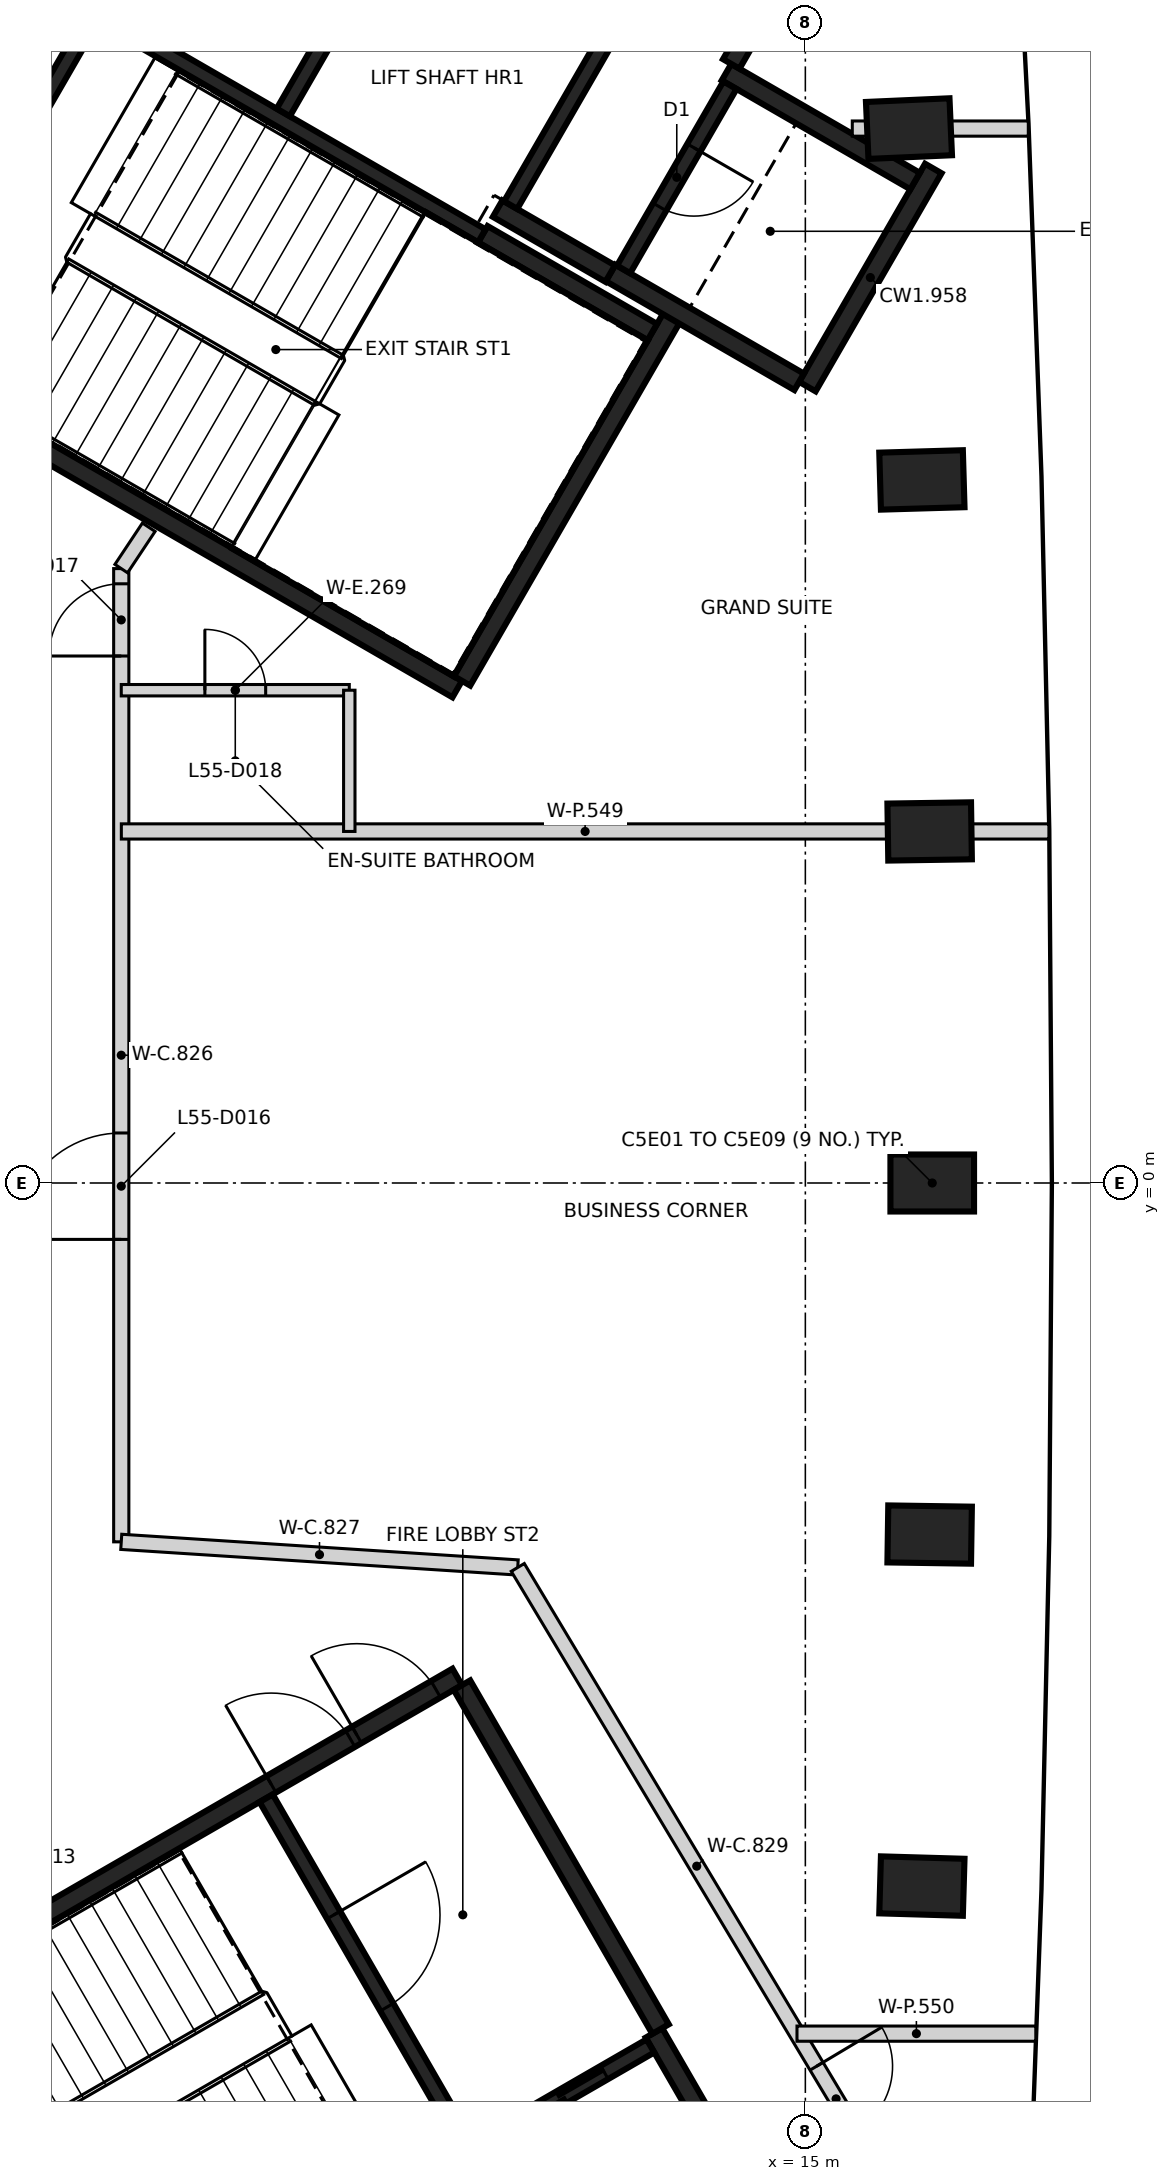
"""IFC4 building model, lengths in metres.
Left out: names, types, materials, properties, quantities, classifications, styles, units other than length and angle.
Written with IfcOpenShell. Run it as: python <this file> out.ifc"""

import sys

from ifc_helpers import new_model, si_unit, direction, frame, frame_2d, origin, origin_2d, place, context, subcontext, project, spatial, rectangle, extrude, element, fill, save


model = new_model("IFC4")
c1 = context("Model", 3, precision=1e-05, world=origin(), true_north=direction((0.0, 1.0)))
c2 = subcontext(c1, "Body", "Model", "MODEL_VIEW")
j1 = project(units=[si_unit("LENGTHUNIT", "METRE"), si_unit("PLANEANGLEUNIT", "RADIAN")], contexts=[c1])
p1 = place(None, origin())
s1 = spatial("IfcSite", under=j1, at=p1, CompositionType="ELEMENT")
p2 = place(p1, origin())
s2 = spatial("IfcBuilding", under=s1, at=p2, CompositionType="ELEMENT")
p3 = place(p2, frame((0.0, 0.0, 221.4)))
s3 = spatial("IfcBuildingStorey", under=s2, at=p3, CompositionType="ELEMENT", Elevation=221.4)
for number, where, z_axis, x_axis in (
    (1, (16.533, -9.25, -0.35), (0.0, 0.0, 1.0), (-1.0, 0.029, 0.0)),
    (2, (16.635, -4.625, -0.35), (0.0, 0.0, 1.0), (-1.0, 0.015, 0.0)),
    (3, (16.669, 0.0, -0.35), (0.0, 0.0, 1.0), (1.0, 0.0, 0.0)),
    (4, (16.635, 4.625, -0.35), (0.0, 0.0, 1.0), (1.0, 0.015, 0.0)),
    (5, (16.533, 9.25, -0.35), (0.0, 0.0, 1.0), (1.0, 0.029, 0.0)),
    (6, (16.363, 13.872, -0.35), (0.0, 0.0, 1.0), (0.999, 0.044, 0.0)),
):
    element("IfcColumn", number, at=place(p3, frame(where, z_axis=z_axis, x_axis=x_axis)), inside=s3, PredefinedType="COLUMN", context=c2, shape_type="SweptSolid", body=[
        extrude(rectangle(XDim=1.1, YDim=0.75, at=origin_2d()), origin(), (0.0, 0.0, 1.0), 3.6),
    ])
p4 = place(p3, frame((10.42, 6.498, 0.0), z_axis=(0.0, 0.0, 1.0), x_axis=(-0.866021906294, 0.500006057782, 0.0)))
e7 = element("IfcWall", 7, at=p4, inside=s3, PredefinedType="SHEAR", context=c2, shape_type="SweptSolid", body=[
    extrude(rectangle(XDim=11.55, YDim=0.25, at=frame_2d((5.775, 0.0))), origin(), (0.0, 0.0, 1.0), 3.25),
])
p5 = place(p4, frame((10.025, 0.0, 0.0)))
e8 = element("IfcOpeningElement", 8, at=p5, cuts=e7, PredefinedType="OPENING", context=c2, shape_type="SweptSolid", body=[
    extrude(rectangle(XDim=1.2, YDim=2.1, at=frame_2d((0.6, 1.05))), frame((0.0, 0.135, 0.0), z_axis=(0.0, -1.0, 0.0), x_axis=(1.0, 0.0, 0.0)), (0.0, 0.0, 1.0), 0.27),
])
p6 = place(p4, frame((8.725, 0.0, 0.0)))
e9 = element("IfcOpeningElement", 9, at=p6, cuts=e7, PredefinedType="OPENING", context=c2, shape_type="SweptSolid", body=[
    extrude(rectangle(XDim=1.2, YDim=2.1, at=frame_2d((0.6, 1.05))), frame((0.0, 0.135, 0.0), z_axis=(0.0, -1.0, 0.0), x_axis=(1.0, 0.0, 0.0)), (0.0, 0.0, 1.0), 0.27),
])
p7 = place(p3, frame((13.238, 11.378, 0.0), z_axis=(0.0, 0.0, 1.0), x_axis=(-0.500008851346, -0.866020293397, 0.0)))
e10 = element("IfcWall", 10, at=p7, inside=s3, PredefinedType="SHEAR", context=c2, shape_type="SweptSolid", body=[
    extrude(rectangle(XDim=5.51, YDim=0.25, at=frame_2d((2.755, 0.0))), origin(), (0.0, 0.0, 1.0), 3.25),
])
p8 = place(p3, frame((16.684, 13.347, 0.0), z_axis=(0.0, 0.0, 1.0), x_axis=(-0.499998874531, -0.866026053573, 0.0)))
e11 = element("IfcWall", 11, at=p8, inside=s3, PredefinedType="SHEAR", context=c2, shape_type="SweptSolid", body=[
    extrude(rectangle(XDim=3.313, YDim=0.25, at=frame_2d((1.656, 0.0))), origin(), (0.0, 0.0, 1.0), 3.25),
])
p9 = place(p3, frame((14.918, 10.54, 0.0), z_axis=(0.0, 0.0, 1.0), x_axis=(-0.866063538972, 0.499933942099, 0.0)))
e12 = element("IfcWall", 12, at=p9, inside=s3, PredefinedType="SHEAR", context=c2, shape_type="SweptSolid", body=[
    extrude(rectangle(XDim=2.865, YDim=0.25, at=frame_2d((1.432, 0.0))), origin(), (0.0, 0.0, 1.0), 3.25),
])
p10 = place(p3, frame((13.963, 14.614, 0.0), z_axis=(0.0, 0.0, 1.0), x_axis=(0.866042235819, -0.499970844928, 0.0)))
e13 = element("IfcWall", 13, at=p10, inside=s3, PredefinedType="SHEAR", context=c2, shape_type="SweptSolid", body=[
    extrude(rectangle(XDim=2.865, YDim=0.25, at=frame_2d((1.432, 0.0))), origin(), (0.0, 0.0, 1.0), 3.25),
])
p11 = place(p3, frame((10.757, 12.481, 0.0), z_axis=(0.0, 0.0, 1.0), x_axis=(0.866022940537, -0.500004266446, 0.0)))
e14 = element("IfcWall", 14, at=p11, inside=s3, PredefinedType="SHEAR", context=c2, shape_type="SweptSolid", body=[
    extrude(rectangle(XDim=2.575, YDim=0.25, at=frame_2d((1.287, 0.0))), origin(), (0.0, 0.0, 1.0), 3.25),
])
p12 = place(p3, frame((12.433, 11.964, 0.0), z_axis=(0.0, 0.0, 1.0), x_axis=(-0.866038183914, 0.499977863513, 0.0)))
e15 = element("IfcWall", 15, at=p12, inside=s3, PredefinedType="SHEAR", context=c2, shape_type="SweptSolid", body=[
    extrude(rectangle(XDim=1.71, YDim=0.25, at=frame_2d((0.855, 0.0))), origin(), (0.0, 0.0, 1.0), 3.25),
])
p13 = place(p3, frame((14.305, 15.207, 0.0), z_axis=(0.0, 0.0, 1.0), x_axis=(-0.499848422343, -0.866112899501, 0.0)))
e16 = element("IfcWall", 16, at=p13, inside=s3, PredefinedType="SHEAR", context=c2, shape_type="SweptSolid", body=[
    extrude(rectangle(XDim=0.559, YDim=0.25, at=frame_2d((0.28, 0.0))), origin(), (0.0, 0.0, 1.0), 3.25),
])
p14 = place(p3, frame((10.743, 12.46, 0.0), z_axis=(0.0, 0.0, 1.0), x_axis=(-0.866018848283, 0.500011354289, 0.0)))
e17 = element("IfcWall", 17, at=p14, inside=s3, PredefinedType="SHEAR", context=c2, shape_type="SweptSolid", body=[
    extrude(rectangle(XDim=5.974, YDim=0.2, at=frame_2d((2.987, 0.0))), origin(), (0.0, 0.0, 1.0), 3.25),
])
p15 = place(p3, frame((3.057, 10.895, 0.0), z_axis=(0.0, 0.0, 1.0), x_axis=(0.500027839223, 0.866009330205, 0.0)))
e18 = element("IfcWall", 18, at=p15, inside=s3, PredefinedType="SHEAR", context=c2, shape_type="SweptSolid", body=[
    extrude(rectangle(XDim=5.098, YDim=0.2, at=frame_2d((2.549, 0.0))), origin(), (0.0, 0.0, 1.0), 3.25),
])
p16 = place(p15, frame((1.774, 0.0, 0.0)))
e19 = element("IfcOpeningElement", 19, at=p16, cuts=e18, PredefinedType="OPENING", context=c2, shape_type="SweptSolid", body=[
    extrude(rectangle(XDim=1.4, YDim=2.1, at=frame_2d((0.7, 1.05))), frame((0.0, 0.11, 0.0), z_axis=(0.0, -1.0, 0.0), x_axis=(1.0, 0.0, 0.0)), (0.0, 0.0, 1.0), 0.22),
])
p17 = place(p3, frame((8.132, 14.084, 0.0), z_axis=(0.0, 0.0, 1.0), x_axis=(0.500030834389, 0.86600760081, 0.0)))
e20 = element("IfcWall", 20, at=p17, inside=s3, PredefinedType="SHEAR", context=c2, shape_type="SweptSolid", body=[
    extrude(rectangle(XDim=3.198, YDim=0.2, at=frame_2d((1.599, 0.0))), origin(), (0.0, 0.0, 1.0), 3.25),
])
p18 = place(p3, frame((14.008, 14.442, 0.0), z_axis=(0.0, 0.0, 1.0), x_axis=(-0.499986818241, -0.866033014143, 0.0)))
e21 = element("IfcWall", 21, at=p18, inside=s3, PredefinedType="SHEAR", context=c2, shape_type="SweptSolid", body=[
    extrude(rectangle(XDim=2.798, YDim=0.2, at=frame_2d((1.399, 0.0))), origin(), (0.0, 0.0, 1.0), 3.25),
])
p19 = place(p18, frame((0.949, 0.0, 0.0)))
e22 = element("IfcOpeningElement", 22, at=p19, cuts=e21, PredefinedType="OPENING", context=c2, shape_type="SweptSolid", body=[
    extrude(rectangle(XDim=0.9, YDim=2.1, at=frame_2d((0.45, 1.05))), frame((0.0, 0.11, 0.0), z_axis=(0.0, -1.0, 0.0), x_axis=(1.0, 0.0, 0.0)), (0.0, 0.0, 1.0), 0.22),
])
p20 = place(p3, frame((12.502, 15.255, 0.0), z_axis=(0.0, 0.0, 1.0), x_axis=(-0.499965018551, -0.866045599391, 0.0)))
e23 = element("IfcWall", 23, at=p20, inside=s3, PredefinedType="SHEAR", context=c2, shape_type="SweptSolid", body=[
    extrude(rectangle(XDim=2.759, YDim=0.2, at=frame_2d((1.379, 0.0))), origin(), (0.0, 0.0, 1.0), 3.25),
])
p21 = place(p3, frame((0.417, -12.273, 0.0), z_axis=(0.0, 0.0, 1.0), x_axis=(0.866021906294, 0.500006057782, 0.0)))
e24 = element("IfcWall", 24, at=p21, inside=s3, PredefinedType="SHEAR", context=c2, shape_type="SweptSolid", body=[
    extrude(rectangle(XDim=11.55, YDim=0.25, at=frame_2d((5.775, 0.0))), origin(), (0.0, 0.0, 1.0), 3.25),
])
p22 = place(p21, frame((10.025, 0.0, 0.0)))
e25 = element("IfcOpeningElement", 25, at=p22, cuts=e24, PredefinedType="OPENING", context=c2, shape_type="SweptSolid", body=[
    extrude(rectangle(XDim=1.2, YDim=2.1, at=frame_2d((0.6, 1.05))), frame((0.0, 0.135, 0.0), z_axis=(0.0, -1.0, 0.0), x_axis=(1.0, 0.0, 0.0)), (0.0, 0.0, 1.0), 0.27),
])
p23 = place(p21, frame((8.725, 0.0, 0.0)))
e26 = element("IfcOpeningElement", 26, at=p23, cuts=e24, PredefinedType="OPENING", context=c2, shape_type="SweptSolid", body=[
    extrude(rectangle(XDim=1.2, YDim=2.1, at=frame_2d((0.6, 1.05))), frame((0.0, 0.135, 0.0), z_axis=(0.0, -1.0, 0.0), x_axis=(1.0, 0.0, 0.0)), (0.0, 0.0, 1.0), 0.27),
])
p24 = place(p3, frame((13.008, -11.181, 0.0), z_axis=(0.0, 0.0, 1.0), x_axis=(0.500001955336, -0.866024274868, 0.0)))
e27 = element("IfcWall", 27, at=p24, inside=s3, PredefinedType="SHEAR", context=c2, shape_type="SweptSolid", body=[
    extrude(rectangle(XDim=6.125, YDim=0.25, at=frame_2d((3.062, 0.0))), origin(), (0.0, 0.0, 1.0), 3.25),
])
p25 = place(p24, frame((3.563, 0.0, 0.0)))
e28 = element("IfcOpeningElement", 28, at=p25, cuts=e27, PredefinedType="OPENING", context=c2, shape_type="SweptSolid", body=[
    extrude(rectangle(XDim=1.0, YDim=2.1, at=frame_2d((0.5, 1.05))), frame((0.0, 0.135, 0.0), z_axis=(0.0, -1.0, 0.0), x_axis=(1.0, 0.0, 0.0)), (0.0, 0.0, 1.0), 0.27),
])
p26 = place(p3, frame((10.483, -6.606, 0.0), z_axis=(0.0, 0.0, 1.0), x_axis=(0.49999885962, -0.866026062182, 0.0)))
e29 = element("IfcWall", 29, at=p26, inside=s3, PredefinedType="SHEAR", context=c2, shape_type="SweptSolid", body=[
    extrude(rectangle(XDim=5.225, YDim=0.25, at=frame_2d((2.612, 0.0))), origin(), (0.0, 0.0, 1.0), 3.25),
])
p27 = place(p3, frame((7.906, -8.094, 0.0), z_axis=(0.0, 0.0, 1.0), x_axis=(0.500027839223, -0.866009330205, 0.0)))
e30 = element("IfcWall", 30, at=p27, inside=s3, PredefinedType="SHEAR", context=c2, shape_type="SweptSolid", body=[
    extrude(rectangle(XDim=5.098, YDim=0.2, at=frame_2d((2.549, 0.0))), origin(), (0.0, 0.0, 1.0), 3.25),
])
p28 = place(p27, frame((1.774, 0.0, 0.0)))
e31 = element("IfcOpeningElement", 31, at=p28, cuts=e30, PredefinedType="OPENING", context=c2, shape_type="SweptSolid", body=[
    extrude(rectangle(XDim=1.4, YDim=2.1, at=frame_2d((0.7, 1.05))), frame((0.0, 0.11, 0.0), z_axis=(0.0, -1.0, 0.0), x_axis=(1.0, 0.0, 0.0)), (0.0, 0.0, 1.0), 0.22),
])
p29 = place(p3, frame((10.666, -12.678, 0.0), z_axis=(0.0, 0.0, 1.0), x_axis=(0.866018407898, 0.500012117035, 0.0)))
e32 = element("IfcWall", 32, at=p29, inside=s3, PredefinedType="SHEAR", context=c2, shape_type="SweptSolid", body=[
    extrude(rectangle(XDim=2.651, YDim=0.2, at=frame_2d((1.325, 0.0))), origin(), (0.0, 0.0, 1.0), 3.25),
])
p30 = place(p29, frame((0.652, 0.0, 0.0)))
e33 = element("IfcOpeningElement", 33, at=p30, cuts=e32, PredefinedType="OPENING", context=c2, shape_type="SweptSolid", body=[
    extrude(rectangle(XDim=1.3, YDim=2.1, at=frame_2d((0.65, 1.05))), frame((0.0, 0.11, 0.0), z_axis=(0.0, -1.0, 0.0), x_axis=(1.0, 0.0, 0.0)), (0.0, 0.0, 1.0), 0.22),
])
p31 = place(p3, frame((6.0, -4.721, 0.0), z_axis=(0.0, 0.0, 1.0), x_axis=(0.0, 1.0, 0.0)))
e34 = element("IfcWall", 34, at=p31, inside=s3, PredefinedType="PARTITIONING", context=c2, shape_type="SweptSolid", body=[
    extrude(rectangle(XDim=12.804, YDim=0.2, at=frame_2d((6.402, 0.0))), origin(), (0.0, 0.0, 1.0), 3.25),
])
p32 = place(p31, frame((3.979, 0.0, 0.0)))
e35 = element("IfcOpeningElement", 35, at=p32, cuts=e34, PredefinedType="OPENING", context=c2, shape_type="SweptSolid", body=[
    extrude(rectangle(XDim=1.4, YDim=2.1, at=frame_2d((0.7, 1.05))), frame((0.0, 0.11, 0.0), z_axis=(0.0, -1.0, 0.0), x_axis=(1.0, 0.0, 0.0)), (0.0, 0.0, 1.0), 0.22),
])
p33 = place(p31, frame((11.654, 0.0, 0.0)))
e36 = element("IfcOpeningElement", 36, at=p33, cuts=e34, PredefinedType="OPENING", context=c2, shape_type="SweptSolid", body=[
    extrude(rectangle(XDim=0.95, YDim=2.1, at=frame_2d((0.475, 1.05))), frame((0.0, 0.11, 0.0), z_axis=(0.0, -1.0, 0.0), x_axis=(1.0, 0.0, 0.0)), (0.0, 0.0, 1.0), 0.22),
])
p34 = place(p3, frame((6.0, -4.721, 0.0), z_axis=(0.0, 0.0, 1.0), x_axis=(0.997917460423, -0.064503815251, 0.0)))
e37 = element("IfcWall", 37, at=p34, inside=s3, PredefinedType="PARTITIONING", context=c2, shape_type="SweptSolid", body=[
    extrude(rectangle(XDim=5.227, YDim=0.2, at=frame_2d((2.614, 0.0))), origin(), (0.0, 0.0, 1.0), 3.25),
])
p35 = place(p3, frame((6.0, 8.083, 0.0), z_axis=(0.0, 0.0, 1.0), x_axis=(0.553665201502, 0.832739361773, 0.0)))
e38 = element("IfcWall", 38, at=p35, inside=s3, PredefinedType="PARTITIONING", context=c2, shape_type="SweptSolid", body=[
    extrude(rectangle(XDim=0.654, YDim=0.2, at=frame_2d((0.327, 0.0))), origin(), (0.0, 0.0, 1.0), 3.25),
])
p36 = place(p3, frame((11.217, -5.058, 0.0), z_axis=(0.0, 0.0, 1.0), x_axis=(0.513856906336, -0.857875911662, 0.0)))
e39 = element("IfcWall", 39, at=p36, inside=s3, PredefinedType="PARTITIONING", context=c2, shape_type="SweptSolid", body=[
    extrude(rectangle(XDim=9.163, YDim=0.2, at=frame_2d((4.581, 0.0))), origin(), (0.0, 0.0, 1.0), 3.25),
])
p37 = place(p36, frame((7.65, 0.0, 0.0)))
e40 = element("IfcOpeningElement", 40, at=p37, cuts=e39, PredefinedType="OPENING", context=c2, shape_type="SweptSolid", body=[
    extrude(rectangle(XDim=1.0, YDim=2.1, at=frame_2d((0.5, 1.05))), frame((0.0, 0.11, 0.0), z_axis=(0.0, -1.0, 0.0), x_axis=(1.0, 0.0, 0.0)), (0.0, 0.0, 1.0), 0.22),
])
p38 = place(p3, frame((6.001, 4.625, 0.0), z_axis=(0.0, 0.0, 1.0), x_axis=(1.0, 0.0, 0.0)))
e41 = element("IfcWall", 41, at=p38, inside=s3, PredefinedType="PARTITIONING", context=c2, shape_type="SweptSolid", body=[
    extrude(rectangle(XDim=12.203, YDim=0.2, at=frame_2d((6.102, 0.0))), origin(), (0.0, 0.0, 1.0), 3.25),
])
p39 = place(p3, frame((14.89, -11.191, 0.0), z_axis=(0.0, 0.0, 1.0), x_axis=(1.0, 0.0, 0.0)))
e42 = element("IfcWall", 42, at=p39, inside=s3, PredefinedType="PARTITIONING", context=c2, shape_type="SweptSolid", body=[
    extrude(rectangle(XDim=3.142, YDim=0.2, at=frame_2d((1.571, 0.0))), origin(), (0.0, 0.0, 1.0), 2.35),
])
p40 = place(p3, frame((15.618, 13.872, 0.0), z_axis=(0.0, 0.0, 1.0), x_axis=(1.0, 0.0, 0.0)))
e43 = element("IfcWall", 43, at=p40, inside=s3, PredefinedType="PARTITIONING", context=c2, shape_type="SweptSolid", body=[
    extrude(rectangle(XDim=2.316, YDim=0.2, at=frame_2d((1.158, 0.0))), origin(), (0.0, 0.0, 1.0), 3.25),
])
p41 = place(p3, frame((6.0, 6.483, 0.0), z_axis=(0.0, 0.0, 1.0), x_axis=(1.0, 0.0, 0.0)))
e44 = element("IfcWall", 44, at=p41, inside=s3, PredefinedType="PARTITIONING", context=c2, shape_type="SweptSolid", body=[
    extrude(rectangle(XDim=3.0, YDim=0.15, at=frame_2d((1.5, 0.0))), origin(), (0.0, 0.0, 1.0), 3.25),
])
p42 = place(p41, frame((1.1, 0.0, 0.0)))
e45 = element("IfcOpeningElement", 45, at=p42, cuts=e44, PredefinedType="OPENING", context=c2, shape_type="SweptSolid", body=[
    extrude(rectangle(XDim=0.8, YDim=2.1, at=frame_2d((0.4, 1.05))), frame((0.0, 0.085, 0.0), z_axis=(0.0, -1.0, 0.0), x_axis=(1.0, 0.0, 0.0)), (0.0, 0.0, 1.0), 0.17),
])
p43 = place(p3, frame((9.0, 4.625, 0.0), z_axis=(0.0, 0.0, 1.0), x_axis=(0.0, 1.0, 0.0)))
e46 = element("IfcWall", 46, at=p43, inside=s3, PredefinedType="PARTITIONING", context=c2, shape_type="SweptSolid", body=[
    extrude(rectangle(XDim=1.858, YDim=0.15, at=frame_2d((0.929, 0.0))), origin(), (0.0, 0.0, 1.0), 3.25),
])
p44 = place(p19, origin())
e47 = element("IfcDoor", 47, at=p44, inside=s3, OperationType="SINGLE_SWING_RIGHT", PredefinedType="DOOR", context=c2, shape_type="SweptSolid", body=[
    extrude(rectangle(XDim=0.9, YDim=2.1, at=frame_2d((0.45, 1.05))), frame((0.0, 0.025, 0.0), z_axis=(0.0, -1.0, 0.0), x_axis=(1.0, 0.0, 0.0)), (0.0, 0.0, 1.0), 0.05),
])
fill(e22, e47)
p45 = place(p30, origin())
e48 = element("IfcDoor", 48, at=p45, inside=s3, OperationType="SLIDING_TO_RIGHT", PredefinedType="DOOR", context=c2, shape_type="SweptSolid", body=[
    extrude(rectangle(XDim=1.3, YDim=2.1, at=frame_2d((0.65, 1.05))), frame((0.0, 0.025, 0.0), z_axis=(0.0, -1.0, 0.0), x_axis=(1.0, 0.0, 0.0)), (0.0, 0.0, 1.0), 0.05),
])
fill(e33, e48)
p46 = place(p22, origin())
e49 = element("IfcDoor", 49, at=p46, inside=s3, OperationType="SINGLE_SWING_LEFT", PredefinedType="DOOR", context=c2, shape_type="SweptSolid", body=[
    extrude(rectangle(XDim=1.2, YDim=2.1, at=frame_2d((0.6, 1.05))), frame((0.0, 0.025, 0.0), z_axis=(0.0, -1.0, 0.0), x_axis=(1.0, 0.0, 0.0)), (0.0, 0.0, 1.0), 0.05),
])
fill(e25, e49)
p47 = place(p23, origin())
e50 = element("IfcDoor", 50, at=p47, inside=s3, OperationType="SINGLE_SWING_RIGHT", PredefinedType="DOOR", context=c2, shape_type="SweptSolid", body=[
    extrude(rectangle(XDim=1.2, YDim=2.1, at=frame_2d((0.6, 1.05))), frame((0.0, 0.025, 0.0), z_axis=(0.0, -1.0, 0.0), x_axis=(1.0, 0.0, 0.0)), (0.0, 0.0, 1.0), 0.05),
])
fill(e26, e50)
p48 = place(p28, origin())
e51 = element("IfcDoor", 51, at=p48, inside=s3, OperationType="SINGLE_SWING_RIGHT", PredefinedType="DOOR", context=c2, shape_type="SweptSolid", body=[
    extrude(rectangle(XDim=1.4, YDim=2.1, at=frame_2d((0.7, 1.05))), frame((0.0, 0.025, 0.0), z_axis=(0.0, -1.0, 0.0), x_axis=(1.0, 0.0, 0.0)), (0.0, 0.0, 1.0), 0.05),
])
fill(e31, e51)
p49 = place(p37, frame((1.0, 0.0, 0.0), z_axis=(0.0, 0.0, 1.0), x_axis=(-1.0, 0.0, 0.0)))
e52 = element("IfcDoor", 52, at=p49, inside=s3, OperationType="SINGLE_SWING_LEFT", PredefinedType="DOOR", context=c2, shape_type="SweptSolid", body=[
    extrude(rectangle(XDim=1.0, YDim=2.1, at=frame_2d((0.5, 1.05))), frame((0.0, 0.025, 0.0), z_axis=(0.0, -1.0, 0.0), x_axis=(1.0, 0.0, 0.0)), (0.0, 0.0, 1.0), 0.05),
])
fill(e40, e52)
p50 = place(p32, frame((1.4, 0.0, 0.0), z_axis=(0.0, 0.0, 1.0), x_axis=(-1.0, 0.0, 0.0)))
e53 = element("IfcDoor", 53, at=p50, inside=s3, OperationType="DOUBLE_DOOR_SINGLE_SWING", PredefinedType="DOOR", context=c2, shape_type="SweptSolid", body=[
    extrude(rectangle(XDim=1.4, YDim=2.1, at=frame_2d((0.7, 1.05))), frame((0.0, 0.025, 0.0), z_axis=(0.0, -1.0, 0.0), x_axis=(1.0, 0.0, 0.0)), (0.0, 0.0, 1.0), 0.05),
])
fill(e35, e53)
p51 = place(p33, frame((0.95, 0.0, 0.0), z_axis=(0.0, 0.0, 1.0), x_axis=(-1.0, 0.0, 0.0)))
e54 = element("IfcDoor", 54, at=p51, inside=s3, OperationType="SINGLE_SWING_LEFT", PredefinedType="DOOR", context=c2, shape_type="SweptSolid", body=[
    extrude(rectangle(XDim=0.95, YDim=2.1, at=frame_2d((0.475, 1.05))), frame((0.0, 0.025, 0.0), z_axis=(0.0, -1.0, 0.0), x_axis=(1.0, 0.0, 0.0)), (0.0, 0.0, 1.0), 0.05),
])
fill(e36, e54)
p52 = place(p42, origin())
e55 = element("IfcDoor", 55, at=p52, inside=s3, OperationType="SINGLE_SWING_LEFT", PredefinedType="DOOR", context=c2, shape_type="SweptSolid", body=[
    extrude(rectangle(XDim=0.8, YDim=2.1, at=frame_2d((0.4, 1.05))), frame((0.0, 0.025, 0.0), z_axis=(0.0, -1.0, 0.0), x_axis=(1.0, 0.0, 0.0)), (0.0, 0.0, 1.0), 0.05),
])
fill(e45, e55)
save(model, sys.argv[1])
